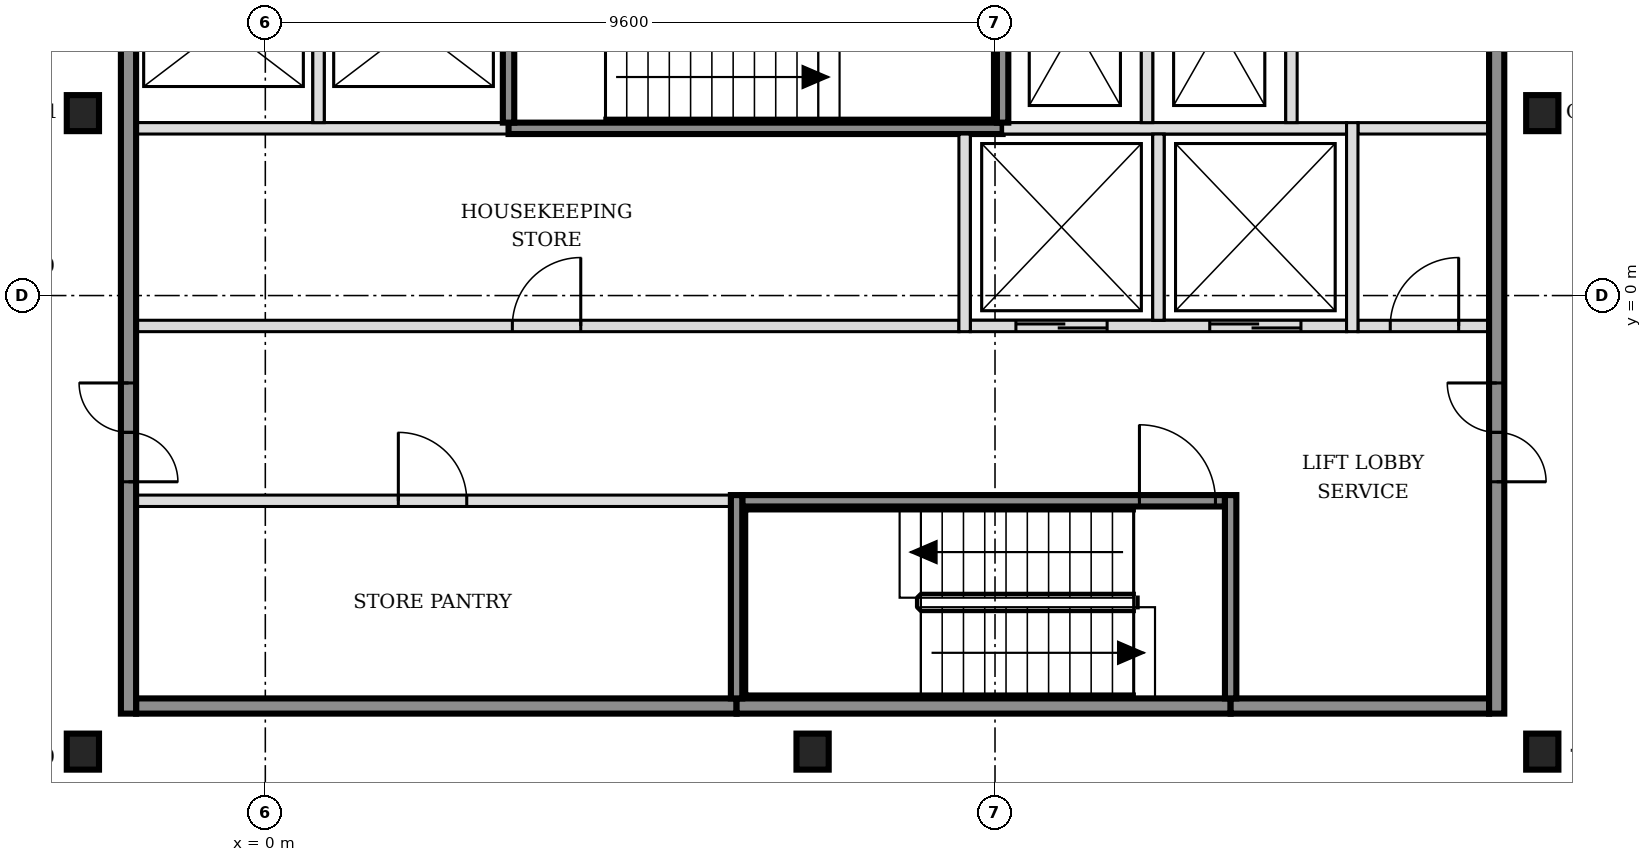
"""IFC4 building model, lengths in metres.
Left out: names, types, materials, properties, quantities, classifications, styles, units other than length and angle.
Written with IfcOpenShell. Run it as: python <this file> out.ifc"""

import sys

from ifc_helpers import new_model, si_unit, direction, frame, frame_2d, origin, origin_2d, place, context, subcontext, project, spatial, rectangle, i_section, extrude, element, fill, save


model = new_model("IFC4")
c1 = context("Model", 3, precision=1e-05, world=origin(), true_north=direction((0.0, 1.0)))
c2 = subcontext(c1, "Body", "Model", "MODEL_VIEW")
j1 = project(units=[si_unit("LENGTHUNIT", "METRE"), si_unit("PLANEANGLEUNIT", "RADIAN")], contexts=[c1])
p1 = place(None, origin())
s1 = spatial("IfcSite", under=j1, at=p1, CompositionType="ELEMENT")
p2 = place(p1, origin())
s2 = spatial("IfcBuilding", under=s1, at=p2, CompositionType="ELEMENT")
p3 = place(p2, frame((0.0, 0.0, 132.6)))
s3 = spatial("IfcBuildingStorey", under=s2, at=p3, CompositionType="ELEMENT", Elevation=132.6)
for number, where, z_axis, x_axis in (
    (1, (-2.4, -6.0, -0.15), (0.0, 0.0, 1.0), (1.0, 0.0, 0.0)),
    (2, (7.2, -6.0, -0.15), (0.0, 0.0, 1.0), (1.0, 0.0, 0.0)),
    (3, (16.8, -6.0, -0.15), (0.0, 0.0, 1.0), (1.0, 0.0, 0.0)),
    (4, (-2.4, 2.4, -0.15), (0.0, 0.0, 1.0), (1.0, 0.0, 0.0)),
    (5, (16.8, 2.4, -0.15), (0.0, 0.0, 1.0), (1.0, 0.0, 0.0)),
):
    element("IfcColumn", number, at=place(p3, frame(where, z_axis=z_axis, x_axis=x_axis)), inside=s3, PredefinedType="COLUMN", context=c2, shape_type="SweptSolid", body=[
        extrude(i_section(OverallWidth=0.424, OverallDepth=0.474, WebThickness=0.048, FlangeThickness=0.077, FilletRadius=0.015, at=origin_2d()), origin(), (0.0, 0.0, 1.0), 3.6),
    ])
p4 = place(p3, frame((-1.7, -5.4, 0.0), z_axis=(0.0, 0.0, 1.0), x_axis=(1.0, 0.0, 0.0)))
e6 = element("IfcWall", 6, at=p4, inside=s3, PredefinedType="SOLIDWALL", context=c2, shape_type="SweptSolid", body=[
    extrude(rectangle(XDim=7.9, YDim=0.2, at=frame_2d((3.95, 0.0))), origin(), (0.0, 0.0, 1.0), 3.45),
])
p5 = place(p3, frame((6.2, -5.4, 0.0), z_axis=(0.0, 0.0, 1.0), x_axis=(1.0, 0.0, 0.0)))
e7 = element("IfcWall", 7, at=p5, inside=s3, PredefinedType="SOLIDWALL", context=c2, shape_type="SweptSolid", body=[
    extrude(rectangle(XDim=6.5, YDim=0.2, at=frame_2d((3.25, 0.0))), origin(), (0.0, 0.0, 1.0), 3.45),
])
p6 = place(p3, frame((12.7, -5.4, 0.0), z_axis=(0.0, 0.0, 1.0), x_axis=(1.0, 0.0, 0.0)))
e8 = element("IfcWall", 8, at=p6, inside=s3, PredefinedType="SOLIDWALL", context=c2, shape_type="SweptSolid", body=[
    extrude(rectangle(XDim=3.4, YDim=0.2, at=frame_2d((1.7, 0.0))), origin(), (0.0, 0.0, 1.0), 3.45),
])
p7 = place(p3, frame((-1.7, -2.7, 0.0), z_axis=(0.0, 0.0, 1.0), x_axis=(1.0, 0.0, 0.0)))
e9 = element("IfcWall", 9, at=p7, inside=s3, PredefinedType="PARTITIONING", context=c2, shape_type="SweptSolid", body=[
    extrude(rectangle(XDim=7.825, YDim=0.15, at=frame_2d((3.913, 0.0))), origin(), (0.0, 0.0, 1.0), 3.45),
])
p8 = place(p7, frame((3.45, 0.0, 0.0)))
e10 = element("IfcOpeningElement", 10, at=p8, cuts=e9, PredefinedType="OPENING", context=c2, shape_type="SweptSolid", body=[
    extrude(rectangle(XDim=0.9, YDim=2.1, at=frame_2d((0.45, 1.05))), frame((0.0, 0.085, 0.0), z_axis=(0.0, -1.0, 0.0), x_axis=(1.0, 0.0, 0.0)), (0.0, 0.0, 1.0), 0.17),
])
p9 = place(p3, frame((6.275, -2.7, 0.0), z_axis=(0.0, 0.0, 1.0), x_axis=(1.0, 0.0, 0.0)))
e11 = element("IfcWall", 11, at=p9, inside=s3, PredefinedType="SOLIDWALL", context=c2, shape_type="SweptSolid", body=[
    extrude(rectangle(XDim=6.35, YDim=0.15, at=frame_2d((3.175, 0.0))), origin(), (0.0, 0.0, 1.0), 3.45),
])
p10 = place(p9, frame((5.225, 0.0, 0.0)))
e12 = element("IfcOpeningElement", 12, at=p10, cuts=e11, PredefinedType="OPENING", context=c2, shape_type="SweptSolid", body=[
    extrude(rectangle(XDim=1.0, YDim=2.1, at=frame_2d((0.5, 1.05))), frame((0.0, 0.085, 0.0), z_axis=(0.0, -1.0, 0.0), x_axis=(1.0, 0.0, 0.0)), (0.0, 0.0, 1.0), 0.17),
])
p11 = place(p3, frame((-1.7, -0.4, 0.0), z_axis=(0.0, 0.0, 1.0), x_axis=(1.0, 0.0, 0.0)))
e13 = element("IfcWall", 13, at=p11, inside=s3, PredefinedType="PARTITIONING", context=c2, shape_type="SweptSolid", body=[
    extrude(rectangle(XDim=10.825, YDim=0.15, at=frame_2d((5.413, 0.0))), origin(), (0.0, 0.0, 1.0), 3.45),
])
p12 = place(p11, frame((4.95, 0.0, 0.0)))
e14 = element("IfcOpeningElement", 14, at=p12, cuts=e13, PredefinedType="OPENING", context=c2, shape_type="SweptSolid", body=[
    extrude(rectangle(XDim=0.9, YDim=2.1, at=frame_2d((0.45, 1.05))), frame((0.0, 0.085, 0.0), z_axis=(0.0, -1.0, 0.0), x_axis=(1.0, 0.0, 0.0)), (0.0, 0.0, 1.0), 0.17),
])
p13 = place(p3, frame((9.275, -0.4, 0.0), z_axis=(0.0, 0.0, 1.0), x_axis=(1.0, 0.0, 0.0)))
e15 = element("IfcWall", 15, at=p13, inside=s3, PredefinedType="SOLIDWALL", context=c2, shape_type="SweptSolid", body=[
    extrude(rectangle(XDim=4.95, YDim=0.15, at=frame_2d((2.475, 0.0))), origin(), (0.0, 0.0, 1.0), 3.45),
])
p14 = place(p13, frame((0.6, 0.0, 0.0)))
e16 = element("IfcOpeningElement", 16, at=p14, cuts=e15, PredefinedType="OPENING", context=c2, shape_type="SweptSolid", body=[
    extrude(rectangle(XDim=1.2, YDim=2.1, at=frame_2d((0.6, 1.05))), frame((0.0, 0.085, 0.0), z_axis=(0.0, -1.0, 0.0), x_axis=(1.0, 0.0, 0.0)), (0.0, 0.0, 1.0), 0.17),
])
p15 = place(p13, frame((3.15, 0.0, 0.0)))
e17 = element("IfcOpeningElement", 17, at=p15, cuts=e15, PredefinedType="OPENING", context=c2, shape_type="SweptSolid", body=[
    extrude(rectangle(XDim=1.2, YDim=2.1, at=frame_2d((0.6, 1.05))), frame((0.0, 0.085, 0.0), z_axis=(0.0, -1.0, 0.0), x_axis=(1.0, 0.0, 0.0)), (0.0, 0.0, 1.0), 0.17),
])
p16 = place(p3, frame((14.375, -0.4, 0.0), z_axis=(0.0, 0.0, 1.0), x_axis=(1.0, 0.0, 0.0)))
e18 = element("IfcWall", 18, at=p16, inside=s3, PredefinedType="PARTITIONING", context=c2, shape_type="SweptSolid", body=[
    extrude(rectangle(XDim=1.725, YDim=0.15, at=frame_2d((0.863, 0.0))), origin(), (0.0, 0.0, 1.0), 3.45),
])
p17 = place(p16, frame((0.425, 0.0, 0.0)))
e19 = element("IfcOpeningElement", 19, at=p17, cuts=e18, PredefinedType="OPENING", context=c2, shape_type="SweptSolid", body=[
    extrude(rectangle(XDim=0.9, YDim=2.1, at=frame_2d((0.45, 1.05))), frame((0.0, 0.085, 0.0), z_axis=(0.0, -1.0, 0.0), x_axis=(1.0, 0.0, 0.0)), (0.0, 0.0, 1.0), 0.17),
])
p18 = place(p3, frame((-1.7, 2.2, 0.0), z_axis=(0.0, 0.0, 1.0), x_axis=(1.0, 0.0, 0.0)))
e20 = element("IfcWall", 20, at=p18, inside=s3, PredefinedType="SOLIDWALL", context=c2, shape_type="SweptSolid", body=[
    extrude(rectangle(XDim=4.9, YDim=0.15, at=frame_2d((2.45, 0.0))), origin(), (0.0, 0.0, 1.0), 3.45),
])
p19 = place(p3, frame((3.2, 2.2, 0.0), z_axis=(0.0, 0.0, 1.0), x_axis=(1.0, 0.0, 0.0)))
e21 = element("IfcWall", 21, at=p19, inside=s3, PredefinedType="SOLIDWALL", context=c2, shape_type="SweptSolid", body=[
    extrude(rectangle(XDim=6.5, YDim=0.15, at=frame_2d((3.25, 0.0))), origin(), (0.0, 0.0, 1.0), 3.45),
])
p20 = place(p3, frame((9.7, 2.2, 0.0), z_axis=(0.0, 0.0, 1.0), x_axis=(1.0, 0.0, 0.0)))
e22 = element("IfcWall", 22, at=p20, inside=s3, PredefinedType="SOLIDWALL", context=c2, shape_type="SweptSolid", body=[
    extrude(rectangle(XDim=4.525, YDim=0.15, at=frame_2d((2.263, 0.0))), origin(), (0.0, 0.0, 1.0), 3.45),
])
p21 = place(p3, frame((14.375, 2.2, 0.0), z_axis=(0.0, 0.0, 1.0), x_axis=(1.0, 0.0, 0.0)))
e23 = element("IfcWall", 23, at=p21, inside=s3, PredefinedType="PARTITIONING", context=c2, shape_type="SweptSolid", body=[
    extrude(rectangle(XDim=1.725, YDim=0.15, at=frame_2d((0.863, 0.0))), origin(), (0.0, 0.0, 1.0), 3.45),
])
p22 = place(p3, frame((-1.8, -5.5, 0.0), z_axis=(0.0, 0.0, 1.0), x_axis=(0.0, 1.0, 0.0)))
e24 = element("IfcWall", 24, at=p22, inside=s3, PredefinedType="SOLIDWALL", context=c2, shape_type="SweptSolid", body=[
    extrude(rectangle(XDim=15.8, YDim=0.2, at=frame_2d((7.9, 0.0))), origin(), (0.0, 0.0, 1.0), 3.45),
])
p23 = place(p22, frame((3.05, 0.0, 0.0)))
e25 = element("IfcOpeningElement", 25, at=p23, cuts=e24, PredefinedType="OPENING", context=c2, shape_type="SweptSolid", body=[
    extrude(rectangle(XDim=1.3, YDim=2.1, at=frame_2d((0.65, 1.05))), frame((0.0, 0.11, 0.0), z_axis=(0.0, -1.0, 0.0), x_axis=(1.0, 0.0, 0.0)), (0.0, 0.0, 1.0), 0.22),
])
p24 = place(p22, frame((11.45, 0.0, 0.0)))
e26 = element("IfcOpeningElement", 26, at=p24, cuts=e24, PredefinedType="OPENING", context=c2, shape_type="SweptSolid", body=[
    extrude(rectangle(XDim=1.3, YDim=2.1, at=frame_2d((0.65, 1.05))), frame((0.0, 0.11, 0.0), z_axis=(0.0, -1.0, 0.0), x_axis=(1.0, 0.0, 0.0)), (0.0, 0.0, 1.0), 0.22),
])
for number, where, z_axis, x_axis in (
    (27, (0.7, 2.275, 0.0), (0.0, 0.0, 1.0), (0.0, 1.0, 0.0)),
    (28, (3.2, 2.275, 0.0), (0.0, 0.0, 1.0), (0.0, 1.0, 0.0)),
):
    element("IfcWall", number, at=place(p3, frame(where, z_axis=z_axis, x_axis=x_axis)), inside=s3, PredefinedType="SOLIDWALL", context=c2, shape_type="SweptSolid", body=[
        extrude(rectangle(XDim=2.55, YDim=0.15, at=frame_2d((1.275, 0.0))), origin(), (0.0, 0.0, 1.0), 3.45),
    ])
p25 = place(p3, frame((6.2, -5.3, 0.0), z_axis=(0.0, 0.0, 1.0), x_axis=(0.0, 1.0, 0.0)))
e29 = element("IfcWall", 29, at=p25, inside=s3, PredefinedType="SOLIDWALL", context=c2, shape_type="SweptSolid", body=[
    extrude(rectangle(XDim=2.675, YDim=0.15, at=frame_2d((1.337, 0.0))), origin(), (0.0, 0.0, 1.0), 3.45),
])
p26 = place(p3, frame((9.2, -0.475, 0.0), z_axis=(0.0, 0.0, 1.0), x_axis=(0.0, 1.0, 0.0)))
e30 = element("IfcWall", 30, at=p26, inside=s3, PredefinedType="SOLIDWALL", context=c2, shape_type="SweptSolid", body=[
    extrude(rectangle(XDim=2.6, YDim=0.15, at=frame_2d((1.3, 0.0))), origin(), (0.0, 0.0, 1.0), 3.45),
])
for number, where, z_axis, x_axis in (
    (31, (9.7, 2.275, 0.0), (0.0, 0.0, 1.0), (0.0, 1.0, 0.0)),
    (32, (11.6, 2.275, 0.0), (0.0, 0.0, 1.0), (0.0, 1.0, 0.0)),
):
    element("IfcWall", number, at=place(p3, frame(where, z_axis=z_axis, x_axis=x_axis)), inside=s3, PredefinedType="SOLIDWALL", context=c2, shape_type="SweptSolid", body=[
        extrude(rectangle(XDim=2.55, YDim=0.15, at=frame_2d((1.275, 0.0))), origin(), (0.0, 0.0, 1.0), 3.45),
    ])
p27 = place(p3, frame((11.75, -0.325, 0.0), z_axis=(0.0, 0.0, 1.0), x_axis=(0.0, 1.0, 0.0)))
e33 = element("IfcWall", 33, at=p27, inside=s3, PredefinedType="SOLIDWALL", context=c2, shape_type="SweptSolid", body=[
    extrude(rectangle(XDim=2.45, YDim=0.15, at=frame_2d((1.225, 0.0))), origin(), (0.0, 0.0, 1.0), 3.45),
])
p28 = place(p3, frame((12.7, -5.3, 0.0), z_axis=(0.0, 0.0, 1.0), x_axis=(0.0, 1.0, 0.0)))
e34 = element("IfcWall", 34, at=p28, inside=s3, PredefinedType="SOLIDWALL", context=c2, shape_type="SweptSolid", body=[
    extrude(rectangle(XDim=2.675, YDim=0.15, at=frame_2d((1.337, 0.0))), origin(), (0.0, 0.0, 1.0), 3.45),
])
p29 = place(p3, frame((13.5, 2.275, 0.0), z_axis=(0.0, 0.0, 1.0), x_axis=(0.0, 1.0, 0.0)))
e35 = element("IfcWall", 35, at=p29, inside=s3, PredefinedType="SOLIDWALL", context=c2, shape_type="SweptSolid", body=[
    extrude(rectangle(XDim=2.55, YDim=0.15, at=frame_2d((1.275, 0.0))), origin(), (0.0, 0.0, 1.0), 3.45),
])
p30 = place(p3, frame((14.3, -0.475, 0.0), z_axis=(0.0, 0.0, 1.0), x_axis=(0.0, 1.0, 0.0)))
e36 = element("IfcWall", 36, at=p30, inside=s3, PredefinedType="SOLIDWALL", context=c2, shape_type="SweptSolid", body=[
    extrude(rectangle(XDim=2.75, YDim=0.15, at=frame_2d((1.375, 0.0))), origin(), (0.0, 0.0, 1.0), 3.45),
])
p31 = place(p3, frame((16.2, -5.5, 0.0), z_axis=(0.0, 0.0, 1.0), x_axis=(0.0, 1.0, 0.0)))
e37 = element("IfcWall", 37, at=p31, inside=s3, PredefinedType="SOLIDWALL", context=c2, shape_type="SweptSolid", body=[
    extrude(rectangle(XDim=15.8, YDim=0.2, at=frame_2d((7.9, 0.0))), origin(), (0.0, 0.0, 1.0), 3.45),
])
p32 = place(p31, frame((3.05, 0.0, 0.0)))
e38 = element("IfcOpeningElement", 38, at=p32, cuts=e37, PredefinedType="OPENING", context=c2, shape_type="SweptSolid", body=[
    extrude(rectangle(XDim=1.3, YDim=2.1, at=frame_2d((0.65, 1.05))), frame((0.0, 0.11, 0.0), z_axis=(0.0, -1.0, 0.0), x_axis=(1.0, 0.0, 0.0)), (0.0, 0.0, 1.0), 0.22),
])
p33 = place(p31, frame((11.45, 0.0, 0.0)))
e39 = element("IfcOpeningElement", 39, at=p33, cuts=e37, PredefinedType="OPENING", context=c2, shape_type="SweptSolid", body=[
    extrude(rectangle(XDim=1.3, YDim=2.1, at=frame_2d((0.65, 1.05))), frame((0.0, 0.11, 0.0), z_axis=(0.0, -1.0, 0.0), x_axis=(1.0, 0.0, 0.0)), (0.0, 0.0, 1.0), 0.22),
])
p34 = place(p14, origin())
e40 = element("IfcDoor", 40, at=p34, inside=s3, OperationType="DOUBLE_DOOR_SLIDING", PredefinedType="DOOR", context=c2, shape_type="SweptSolid", body=[
    extrude(rectangle(XDim=1.2, YDim=2.1, at=frame_2d((0.6, 1.05))), frame((0.0, 0.025, 0.0), z_axis=(0.0, -1.0, 0.0), x_axis=(1.0, 0.0, 0.0)), (0.0, 0.0, 1.0), 0.05),
])
fill(e16, e40)
p35 = place(p15, origin())
e41 = element("IfcDoor", 41, at=p35, inside=s3, OperationType="DOUBLE_DOOR_SLIDING", PredefinedType="DOOR", context=c2, shape_type="SweptSolid", body=[
    extrude(rectangle(XDim=1.2, YDim=2.1, at=frame_2d((0.6, 1.05))), frame((0.0, 0.025, 0.0), z_axis=(0.0, -1.0, 0.0), x_axis=(1.0, 0.0, 0.0)), (0.0, 0.0, 1.0), 0.05),
])
fill(e17, e41)
p36 = place(p10, origin())
e42 = element("IfcDoor", 42, at=p36, inside=s3, OperationType="SINGLE_SWING_LEFT", PredefinedType="DOOR", context=c2, shape_type="SweptSolid", body=[
    extrude(rectangle(XDim=1.0, YDim=2.1, at=frame_2d((0.5, 1.05))), frame((0.0, 0.025, 0.0), z_axis=(0.0, -1.0, 0.0), x_axis=(1.0, 0.0, 0.0)), (0.0, 0.0, 1.0), 0.05),
])
fill(e12, e42)
p37 = place(p23, origin())
e43 = element("IfcDoor", 43, at=p37, inside=s3, OperationType="DOUBLE_DOOR_SINGLE_SWING", PredefinedType="DOOR", context=c2, shape_type="SweptSolid", body=[
    extrude(rectangle(XDim=1.3, YDim=2.1, at=frame_2d((0.65, 1.05))), frame((0.0, 0.025, 0.0), z_axis=(0.0, -1.0, 0.0), x_axis=(1.0, 0.0, 0.0)), (0.0, 0.0, 1.0), 0.05),
])
fill(e25, e43)
p38 = place(p32, origin())
e44 = element("IfcDoor", 44, at=p38, inside=s3, OperationType="DOUBLE_DOOR_SINGLE_SWING", PredefinedType="DOOR", context=c2, shape_type="SweptSolid", body=[
    extrude(rectangle(XDim=1.3, YDim=2.1, at=frame_2d((0.65, 1.05))), frame((0.0, 0.025, 0.0), z_axis=(0.0, -1.0, 0.0), x_axis=(1.0, 0.0, 0.0)), (0.0, 0.0, 1.0), 0.05),
])
fill(e38, e44)
p39 = place(p17, origin())
e45 = element("IfcDoor", 45, at=p39, inside=s3, OperationType="SINGLE_SWING_RIGHT", PredefinedType="DOOR", context=c2, shape_type="SweptSolid", body=[
    extrude(rectangle(XDim=0.9, YDim=2.1, at=frame_2d((0.45, 1.05))), frame((0.0, 0.025, 0.0), z_axis=(0.0, -1.0, 0.0), x_axis=(1.0, 0.0, 0.0)), (0.0, 0.0, 1.0), 0.05),
])
fill(e19, e45)
p40 = place(p8, origin())
e46 = element("IfcDoor", 46, at=p40, inside=s3, OperationType="SINGLE_SWING_LEFT", PredefinedType="DOOR", context=c2, shape_type="SweptSolid", body=[
    extrude(rectangle(XDim=0.9, YDim=2.1, at=frame_2d((0.45, 1.05))), frame((0.0, 0.025, 0.0), z_axis=(0.0, -1.0, 0.0), x_axis=(1.0, 0.0, 0.0)), (0.0, 0.0, 1.0), 0.05),
])
fill(e10, e46)
p41 = place(p12, origin())
e47 = element("IfcDoor", 47, at=p41, inside=s3, OperationType="SINGLE_SWING_RIGHT", PredefinedType="DOOR", context=c2, shape_type="SweptSolid", body=[
    extrude(rectangle(XDim=0.9, YDim=2.1, at=frame_2d((0.45, 1.05))), frame((0.0, 0.025, 0.0), z_axis=(0.0, -1.0, 0.0), x_axis=(1.0, 0.0, 0.0)), (0.0, 0.0, 1.0), 0.05),
])
fill(e14, e47)
save(model, sys.argv[1])
